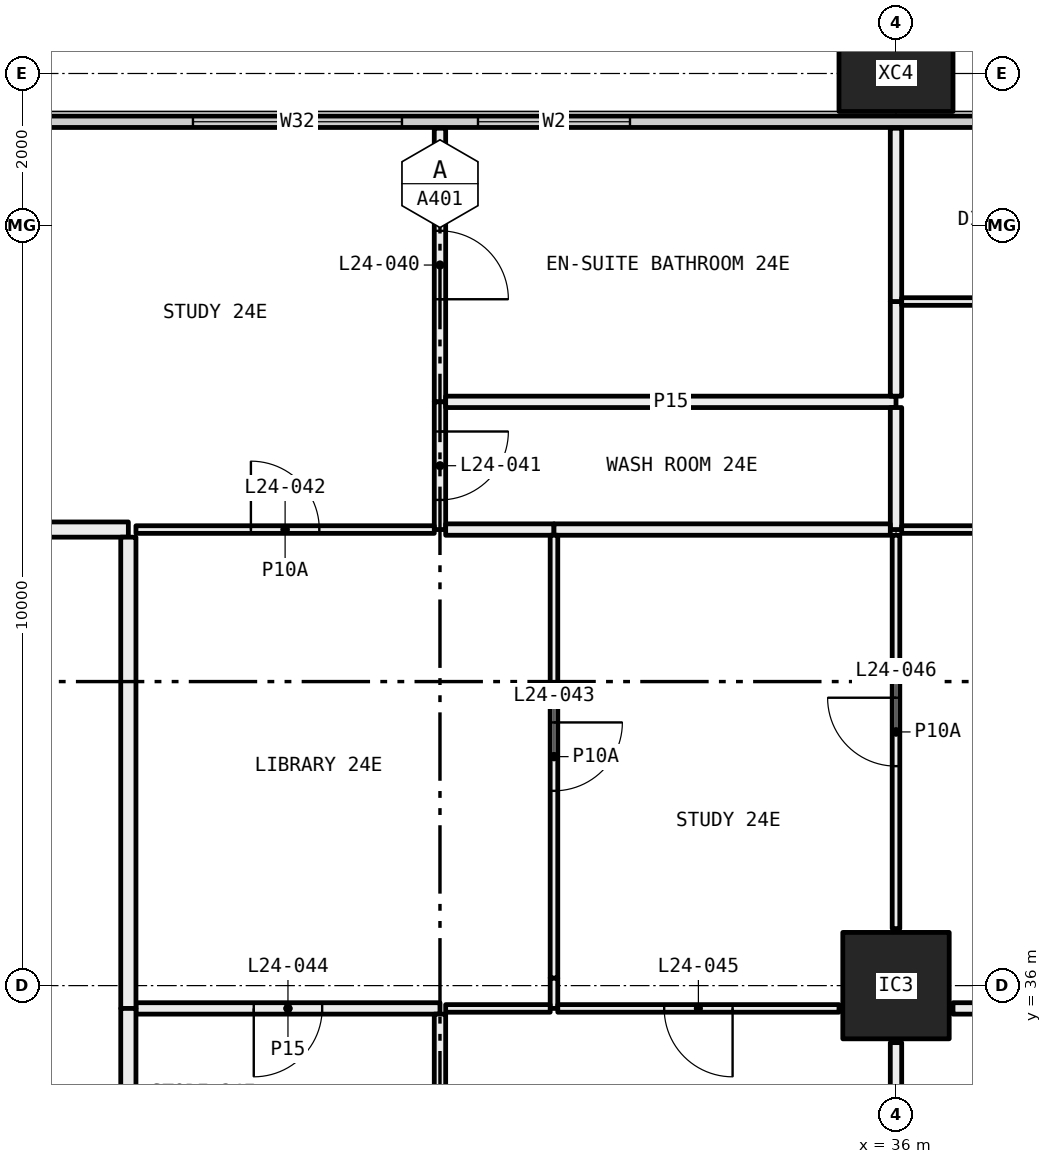
"""IFC4 building model, lengths in metres.
Left out: names, types, materials, properties, quantities, classifications, styles, units other than length and angle.
Written with IfcOpenShell. Run it as: python <this file> out.ifc"""

import sys

from ifc_helpers import new_model, si_unit, direction, frame, frame_2d, origin, origin_2d, place, context, subcontext, project, spatial, rectangle, hollow_rectangle, extrude, element, fill, save


model = new_model("IFC4")
c1 = context("Model", 3, precision=1e-05, world=origin(), true_north=direction((0.0, 1.0)))
c2 = subcontext(c1, "Body", "Model", "MODEL_VIEW")
j1 = project(units=[si_unit("LENGTHUNIT", "METRE"), si_unit("PLANEANGLEUNIT", "RADIAN")], contexts=[c1])
p1 = place(None, origin())
s1 = spatial("IfcSite", under=j1, at=p1, CompositionType="ELEMENT")
p2 = place(p1, origin())
s2 = spatial("IfcBuilding", under=s1, at=p2, CompositionType="ELEMENT")
p3 = place(p2, frame((0.0, 0.0, 96.6)))
s3 = spatial("IfcBuildingStorey", under=s2, at=p3, CompositionType="ELEMENT", Elevation=96.6)
p4 = place(p3, frame((36.0, 36.0, 0.0), z_axis=(0.0, 0.0, 1.0), x_axis=(1.0, 0.0, 0.0)))
e1 = element("IfcColumn", 1, at=p4, inside=s3, PredefinedType="COLUMN", context=c2, shape_type="SweptSolid", body=[
    extrude(hollow_rectangle(XDim=1.4, YDim=1.4, WallThickness=0.06, at=origin_2d()), origin(), (0.0, 0.0, 1.0), 3.05),
])
p5 = place(p3, frame((36.0, 48.0, -0.4), z_axis=(0.0, 0.0, 1.0), x_axis=(1.0, 0.0, 0.0)))
e2 = element("IfcColumn", 2, at=p5, inside=s3, PredefinedType="COLUMN", context=c2, shape_type="SweptSolid", body=[
    extrude(hollow_rectangle(XDim=1.5, YDim=1.0, WallThickness=0.06, at=origin_2d()), origin(), (0.0, 0.0, 1.0), 3.45),
])
p6 = place(p3, frame((6.56, 47.365, 0.0), z_axis=(0.0, 0.0, 1.0), x_axis=(1.0, 0.0, 0.0)))
e3 = element("IfcWall", 3, at=p6, inside=s3, PredefinedType="ELEMENTEDWALL", context=c2, shape_type="SweptSolid", body=[
    extrude(rectangle(XDim=58.88, YDim=0.15, at=frame_2d((29.44, 0.0))), origin(), (0.0, 0.0, 1.0), 3.05),
])
p7 = place(p6, frame((0.44, 0.0, 0.45)))
e4 = element("IfcOpeningElement", 4, at=p7, cuts=e3, PredefinedType="OPENING", context=c2, shape_type="SweptSolid", body=[
    extrude(rectangle(XDim=4.5, YDim=2.55, at=frame_2d((2.25, 1.275))), frame((0.0, 0.085, 0.0), z_axis=(0.0, -1.0, 0.0), x_axis=(1.0, 0.0, 0.0)), (0.0, 0.0, 1.0), 0.17),
])
p8 = place(p6, frame((8.19, 0.0, 0.45)))
e5 = element("IfcOpeningElement", 5, at=p8, cuts=e3, PredefinedType="OPENING", context=c2, shape_type="SweptSolid", body=[
    extrude(rectangle(XDim=2.75, YDim=2.55, at=frame_2d((1.375, 1.275))), frame((0.0, 0.085, 0.0), z_axis=(0.0, -1.0, 0.0), x_axis=(1.0, 0.0, 0.0)), (0.0, 0.0, 1.0), 0.17),
])
p9 = place(p6, frame((11.94, 0.0, 0.45)))
e6 = element("IfcOpeningElement", 6, at=p9, cuts=e3, PredefinedType="OPENING", context=c2, shape_type="SweptSolid", body=[
    extrude(rectangle(XDim=2.75, YDim=2.55, at=frame_2d((1.375, 1.275))), frame((0.0, 0.085, 0.0), z_axis=(0.0, -1.0, 0.0), x_axis=(1.0, 0.0, 0.0)), (0.0, 0.0, 1.0), 0.17),
])
p10 = place(p6, frame((20.19, 0.0, 0.45)))
e7 = element("IfcOpeningElement", 7, at=p10, cuts=e3, PredefinedType="OPENING", context=c2, shape_type="SweptSolid", body=[
    extrude(rectangle(XDim=2.75, YDim=2.55, at=frame_2d((1.375, 1.275))), frame((0.0, 0.085, 0.0), z_axis=(0.0, -1.0, 0.0), x_axis=(1.0, 0.0, 0.0)), (0.0, 0.0, 1.0), 0.17),
])
p11 = place(p6, frame((23.94, 0.0, 0.45)))
e8 = element("IfcOpeningElement", 8, at=p11, cuts=e3, PredefinedType="OPENING", context=c2, shape_type="SweptSolid", body=[
    extrude(rectangle(XDim=2.0, YDim=2.55, at=frame_2d((1.0, 1.275))), frame((0.0, 0.085, 0.0), z_axis=(0.0, -1.0, 0.0), x_axis=(1.0, 0.0, 0.0)), (0.0, 0.0, 1.0), 0.17),
])
p12 = place(p6, frame((32.19, 0.0, 0.45)))
e9 = element("IfcOpeningElement", 9, at=p12, cuts=e3, PredefinedType="OPENING", context=c2, shape_type="SweptSolid", body=[
    extrude(rectangle(XDim=2.75, YDim=2.55, at=frame_2d((1.375, 1.275))), frame((0.0, 0.085, 0.0), z_axis=(0.0, -1.0, 0.0), x_axis=(1.0, 0.0, 0.0)), (0.0, 0.0, 1.0), 0.17),
])
p13 = place(p6, frame((35.94, 0.0, 0.45)))
e10 = element("IfcOpeningElement", 10, at=p13, cuts=e3, PredefinedType="OPENING", context=c2, shape_type="SweptSolid", body=[
    extrude(rectangle(XDim=2.75, YDim=2.55, at=frame_2d((1.375, 1.275))), frame((0.0, 0.085, 0.0), z_axis=(0.0, -1.0, 0.0), x_axis=(1.0, 0.0, 0.0)), (0.0, 0.0, 1.0), 0.17),
])
p14 = place(p6, frame((44.19, 0.0, 0.45)))
e11 = element("IfcOpeningElement", 11, at=p14, cuts=e3, PredefinedType="OPENING", context=c2, shape_type="SweptSolid", body=[
    extrude(rectangle(XDim=2.75, YDim=2.55, at=frame_2d((1.375, 1.275))), frame((0.0, 0.085, 0.0), z_axis=(0.0, -1.0, 0.0), x_axis=(1.0, 0.0, 0.0)), (0.0, 0.0, 1.0), 0.17),
])
p15 = place(p6, frame((47.94, 0.0, 0.45)))
e12 = element("IfcOpeningElement", 12, at=p15, cuts=e3, PredefinedType="OPENING", context=c2, shape_type="SweptSolid", body=[
    extrude(rectangle(XDim=2.0, YDim=2.55, at=frame_2d((1.0, 1.275))), frame((0.0, 0.085, 0.0), z_axis=(0.0, -1.0, 0.0), x_axis=(1.0, 0.0, 0.0)), (0.0, 0.0, 1.0), 0.17),
])
p16 = place(p6, frame((53.94, 0.0, 0.45)))
e13 = element("IfcOpeningElement", 13, at=p16, cuts=e3, PredefinedType="OPENING", context=c2, shape_type="SweptSolid", body=[
    extrude(rectangle(XDim=4.5, YDim=2.55, at=frame_2d((2.25, 1.275))), frame((0.0, 0.085, 0.0), z_axis=(0.0, -1.0, 0.0), x_axis=(1.0, 0.0, 0.0)), (0.0, 0.0, 1.0), 0.17),
])
p17 = place(p3, frame((30.0, 43.68, 0.0), z_axis=(0.0, 0.0, 1.0), x_axis=(0.0, 1.0, 0.0)))
e14 = element("IfcWall", 14, at=p17, inside=s3, PredefinedType="PARTITIONING", context=c2, shape_type="SweptSolid", body=[
    extrude(rectangle(XDim=3.6, YDim=0.15, at=frame_2d((1.8, 0.0))), origin(), (0.0, 0.0, 1.0), 3.05),
])
p18 = place(p17, frame((1.35, 0.0, 0.0)))
e15 = element("IfcOpeningElement", 15, at=p18, cuts=e14, PredefinedType="OPENING", context=c2, shape_type="SweptSolid", body=[
    extrude(rectangle(XDim=0.9, YDim=2.1, at=frame_2d((0.45, 1.05))), frame((0.0, 0.085, 0.0), z_axis=(0.0, -1.0, 0.0), x_axis=(1.0, 0.0, 0.0)), (0.0, 0.0, 1.0), 0.17),
])
p19 = place(p3, frame((30.0, 42.0, 0.0), z_axis=(0.0, 0.0, 1.0), x_axis=(0.0, 1.0, 0.0)))
e16 = element("IfcWall", 16, at=p19, inside=s3, PredefinedType="PARTITIONING", context=c2, shape_type="SweptSolid", body=[
    extrude(rectangle(XDim=1.68, YDim=0.15, at=frame_2d((0.84, 0.0))), origin(), (0.0, 0.0, 1.0), 3.05),
])
p20 = place(p19, frame((0.39, 0.0, 0.0)))
e17 = element("IfcOpeningElement", 17, at=p20, cuts=e16, PredefinedType="OPENING", context=c2, shape_type="SweptSolid", body=[
    extrude(rectangle(XDim=0.9, YDim=2.1, at=frame_2d((0.45, 1.05))), frame((0.0, 0.085, 0.0), z_axis=(0.0, -1.0, 0.0), x_axis=(1.0, 0.0, 0.0)), (0.0, 0.0, 1.0), 0.17),
])
p21 = place(p3, frame((26.0, 42.0, 0.0), z_axis=(0.0, 0.0, 1.0), x_axis=(1.0, 0.0, 0.0)))
e18 = element("IfcWall", 18, at=p21, inside=s3, PredefinedType="PARTITIONING", context=c2, shape_type="SweptSolid", body=[
    extrude(rectangle(XDim=3.925, YDim=0.1, at=frame_2d((1.962, 0.0))), origin(), (0.0, 0.0, 1.0), 3.05),
])
p22 = place(p21, frame((1.512, 0.0, 0.0)))
e19 = element("IfcOpeningElement", 19, at=p22, cuts=e18, PredefinedType="OPENING", context=c2, shape_type="SweptSolid", body=[
    extrude(rectangle(XDim=0.9, YDim=2.1, at=frame_2d((0.45, 1.05))), frame((0.0, 0.06, 0.0), z_axis=(0.0, -1.0, 0.0), x_axis=(1.0, 0.0, 0.0)), (0.0, 0.0, 1.0), 0.12),
])
p23 = place(p3, frame((24.0, 42.0, 0.0), z_axis=(0.0, 0.0, 1.0), x_axis=(1.0, 0.0, 0.0)))
e20 = element("IfcWall", 20, at=p23, inside=s3, PredefinedType="PARTITIONING", context=c2, shape_type="SweptSolid", body=[
    extrude(rectangle(XDim=1.9, YDim=0.2, at=frame_2d((0.95, 0.0))), origin(), (0.0, 0.0, 1.0), 3.05),
])
p24 = place(p3, frame((30.075, 43.68, 0.0), z_axis=(0.0, 0.0, 1.0), x_axis=(1.0, 0.0, 0.0)))
e21 = element("IfcWall", 21, at=p24, inside=s3, PredefinedType="PARTITIONING", context=c2, shape_type="SweptSolid", body=[
    extrude(rectangle(XDim=5.925, YDim=0.15, at=frame_2d((2.962, 0.0))), origin(), (0.0, 0.0, 1.0), 2.45),
])
p25 = place(p3, frame((36.0, 43.755, 0.0), z_axis=(0.0, 0.0, 1.0), x_axis=(0.0, 1.0, 0.0)))
e22 = element("IfcWall", 22, at=p25, inside=s3, PredefinedType="PARTITIONING", context=c2, shape_type="SweptSolid", body=[
    extrude(rectangle(XDim=1.245, YDim=0.15, at=frame_2d((0.623, 0.0))), origin(), (0.0, 0.0, 1.0), 2.45),
])
p26 = place(p3, frame((36.0, 45.0, 0.0), z_axis=(0.0, 0.0, 1.0), x_axis=(0.0, 1.0, 0.0)))
e23 = element("IfcWall", 23, at=p26, inside=s3, PredefinedType="PARTITIONING", context=c2, shape_type="SweptSolid", body=[
    extrude(rectangle(XDim=2.28, YDim=0.15, at=frame_2d((1.14, 0.0))), origin(), (0.0, 0.0, 1.0), 2.45),
])
p27 = place(p3, frame((36.0, 42.0, 0.0), z_axis=(0.0, 0.0, 1.0), x_axis=(0.0, 1.0, 0.0)))
e24 = element("IfcWall", 24, at=p27, inside=s3, PredefinedType="PARTITIONING", context=c2, shape_type="SweptSolid", body=[
    extrude(rectangle(XDim=1.605, YDim=0.15, at=frame_2d((0.802, 0.0))), origin(), (0.0, 0.0, 1.0), 2.45),
])
p28 = place(p3, frame((30.075, 42.0, 0.0), z_axis=(0.0, 0.0, 1.0), x_axis=(1.0, 0.0, 0.0)))
e25 = element("IfcWall", 25, at=p28, inside=s3, PredefinedType="PARTITIONING", context=c2, shape_type="SweptSolid", body=[
    extrude(rectangle(XDim=1.425, YDim=0.15, at=frame_2d((0.712, 0.0))), origin(), (0.0, 0.0, 1.0), 3.05),
])
p29 = place(p3, frame((31.5, 42.0, 0.0), z_axis=(0.0, 0.0, 1.0), x_axis=(1.0, 0.0, 0.0)))
e26 = element("IfcWall", 26, at=p29, inside=s3, PredefinedType="PARTITIONING", context=c2, shape_type="SweptSolid", body=[
    extrude(rectangle(XDim=4.425, YDim=0.15, at=frame_2d((2.212, 0.0))), origin(), (0.0, 0.0, 1.0), 2.45),
])
p30 = place(p3, frame((54.0, 45.0, 0.0), z_axis=(0.0, 0.0, 1.0), x_axis=(-1.0, 0.0, 0.0)))
e27 = element("IfcWall", 27, at=p30, inside=s3, PredefinedType="PARTITIONING", context=c2, shape_type="SweptSolid", body=[
    extrude(rectangle(XDim=17.925, YDim=0.1, at=frame_2d((8.962, 0.0))), origin(), (0.0, 0.0, 1.0), 2.45),
])
p31 = place(p30, frame((8.512, 0.0, 0.0)))
e28 = element("IfcOpeningElement", 28, at=p31, cuts=e27, PredefinedType="OPENING", context=c2, shape_type="SweptSolid", body=[
    extrude(rectangle(XDim=0.9, YDim=2.1, at=frame_2d((0.45, 1.05))), frame((0.0, 0.06, 0.0), z_axis=(0.0, -1.0, 0.0), x_axis=(1.0, 0.0, 0.0)), (0.0, 0.0, 1.0), 0.12),
])
p32 = place(p3, frame((36.075, 42.0, 0.0), z_axis=(0.0, 0.0, 1.0), x_axis=(1.0, 0.0, 0.0)))
e29 = element("IfcWall", 29, at=p32, inside=s3, PredefinedType="PARTITIONING", context=c2, shape_type="SweptSolid", body=[
    extrude(rectangle(XDim=9.925, YDim=0.1, at=frame_2d((4.962, 0.0))), origin(), (0.0, 0.0, 1.0), 2.45),
])
p33 = place(p32, frame((4.512, 0.0, 0.0)))
e30 = element("IfcOpeningElement", 30, at=p33, cuts=e29, PredefinedType="OPENING", context=c2, shape_type="SweptSolid", body=[
    extrude(rectangle(XDim=0.9, YDim=2.1, at=frame_2d((0.45, 1.05))), frame((0.0, 0.06, 0.0), z_axis=(0.0, -1.0, 0.0), x_axis=(1.0, 0.0, 0.0)), (0.0, 0.0, 1.0), 0.12),
])
p34 = place(p3, frame((31.5, 35.7, 0.0), z_axis=(0.0, 0.0, 1.0), x_axis=(0.0, 1.0, 0.0)))
e31 = element("IfcWall", 31, at=p34, inside=s3, PredefinedType="PARTITIONING", context=c2, shape_type="SweptSolid", body=[
    extrude(rectangle(XDim=0.4, YDim=0.1, at=frame_2d((0.2, 0.0))), origin(), (0.0, 0.0, 1.0), 2.45),
])
p35 = place(p3, frame((31.5, 36.1, 0.0), z_axis=(0.0, 0.0, 1.0), x_axis=(0.0, 1.0, 0.0)))
e32 = element("IfcWall", 32, at=p35, inside=s3, PredefinedType="PARTITIONING", context=c2, shape_type="SweptSolid", body=[
    extrude(rectangle(XDim=5.825, YDim=0.1, at=frame_2d((2.913, 0.0))), origin(), (0.0, 0.0, 1.0), 3.05),
])
p36 = place(p35, frame((2.462, 0.0, 0.0)))
e33 = element("IfcOpeningElement", 33, at=p36, cuts=e32, PredefinedType="OPENING", context=c2, shape_type="SweptSolid", body=[
    extrude(rectangle(XDim=0.9, YDim=2.1, at=frame_2d((0.45, 1.05))), frame((0.0, 0.06, 0.0), z_axis=(0.0, -1.0, 0.0), x_axis=(1.0, 0.0, 0.0)), (0.0, 0.0, 1.0), 0.12),
])
p37 = place(p3, frame((26.0, 35.7, 0.0), z_axis=(0.0, 0.0, 1.0), x_axis=(1.0, 0.0, 0.0)))
e34 = element("IfcWall", 34, at=p37, inside=s3, PredefinedType="PARTITIONING", context=c2, shape_type="SweptSolid", body=[
    extrude(rectangle(XDim=4.0, YDim=0.15, at=frame_2d((2.0, 0.0))), origin(), (0.0, 0.0, 1.0), 3.05),
])
p38 = place(p37, frame((1.55, 0.0, 0.0)))
e35 = element("IfcOpeningElement", 35, at=p38, cuts=e34, PredefinedType="OPENING", context=c2, shape_type="SweptSolid", body=[
    extrude(rectangle(XDim=0.9, YDim=2.1, at=frame_2d((0.45, 1.05))), frame((0.0, 0.085, 0.0), z_axis=(0.0, -1.0, 0.0), x_axis=(1.0, 0.0, 0.0)), (0.0, 0.0, 1.0), 0.17),
])
p39 = place(p3, frame((30.075, 35.7, 0.0), z_axis=(0.0, 0.0, 1.0), x_axis=(1.0, 0.0, 0.0)))
e36 = element("IfcWall", 36, at=p39, inside=s3, PredefinedType="PARTITIONING", context=c2, shape_type="SweptSolid", body=[
    extrude(rectangle(XDim=1.375, YDim=0.1, at=frame_2d((0.688, 0.0))), origin(), (0.0, 0.0, 1.0), 3.05),
])
p40 = place(p3, frame((25.9, 41.9, 0.0), z_axis=(0.0, 0.0, 1.0), x_axis=(0.0, -1.0, 0.0)))
e37 = element("IfcWall", 37, at=p40, inside=s3, PredefinedType="PARTITIONING", context=c2, shape_type="SweptSolid", body=[
    extrude(rectangle(XDim=6.2, YDim=0.2, at=frame_2d((3.1, 0.0))), origin(), (0.0, 0.0, 1.0), 2.45),
])
p41 = place(p3, frame((31.55, 35.7, 0.0), z_axis=(0.0, 0.0, 1.0), x_axis=(1.0, 0.0, 0.0)))
e38 = element("IfcWall", 38, at=p41, inside=s3, PredefinedType="PARTITIONING", context=c2, shape_type="SweptSolid", body=[
    extrude(rectangle(XDim=3.7, YDim=0.1, at=frame_2d((1.85, 0.0))), origin(), (0.0, 0.0, 1.0), 3.05),
])
p42 = place(p41, frame((1.4, 0.0, 0.0)))
e39 = element("IfcOpeningElement", 39, at=p42, cuts=e38, PredefinedType="OPENING", context=c2, shape_type="SweptSolid", body=[
    extrude(rectangle(XDim=0.9, YDim=2.1, at=frame_2d((0.45, 1.05))), frame((0.0, 0.06, 0.0), z_axis=(0.0, -1.0, 0.0), x_axis=(1.0, 0.0, 0.0)), (0.0, 0.0, 1.0), 0.12),
])
p43 = place(p3, frame((36.0, 36.75, 0.0), z_axis=(0.0, 0.0, 1.0), x_axis=(0.0, 1.0, 0.0)))
e40 = element("IfcWall", 40, at=p43, inside=s3, PredefinedType="PARTITIONING", context=c2, shape_type="SweptSolid", body=[
    extrude(rectangle(XDim=5.175, YDim=0.1, at=frame_2d((2.587, 0.0))), origin(), (0.0, 0.0, 1.0), 2.45),
])
p44 = place(p43, frame((2.137, 0.0, 0.0)))
e41 = element("IfcOpeningElement", 41, at=p44, cuts=e40, PredefinedType="OPENING", context=c2, shape_type="SweptSolid", body=[
    extrude(rectangle(XDim=0.9, YDim=2.1, at=frame_2d((0.45, 1.05))), frame((0.0, 0.06, 0.0), z_axis=(0.0, -1.0, 0.0), x_axis=(1.0, 0.0, 0.0)), (0.0, 0.0, 1.0), 0.12),
])
p45 = place(p3, frame((30.0, 33.675, 0.0), z_axis=(0.0, 0.0, 1.0), x_axis=(0.0, 1.0, 0.0)))
e42 = element("IfcWall", 42, at=p45, inside=s3, PredefinedType="PARTITIONING", context=c2, shape_type="SweptSolid", body=[
    extrude(rectangle(XDim=1.95, YDim=0.15, at=frame_2d((0.975, 0.0))), origin(), (0.0, 0.0, 1.0), 3.05),
])
p46 = place(p3, frame((25.9, 35.7, 0.0), z_axis=(0.0, 0.0, 1.0), x_axis=(0.0, -1.0, 0.0)))
e43 = element("IfcWall", 43, at=p46, inside=s3, PredefinedType="PARTITIONING", context=c2, shape_type="SweptSolid", body=[
    extrude(rectangle(XDim=2.1, YDim=0.2, at=frame_2d((1.05, 0.0))), origin(), (0.0, 0.0, 1.0), 3.05),
])
p47 = place(p3, frame((36.0, 31.3, 0.0), z_axis=(0.0, 0.0, 1.0), x_axis=(0.0, 1.0, 0.0)))
e44 = element("IfcWall", 44, at=p47, inside=s3, PredefinedType="PARTITIONING", context=c2, shape_type="SweptSolid", body=[
    extrude(rectangle(XDim=3.95, YDim=0.15, at=frame_2d((1.975, 0.0))), origin(), (0.0, 0.0, 1.0), 2.45),
])
p48 = place(p47, frame((1.525, 0.0, 0.0)))
e45 = element("IfcOpeningElement", 45, at=p48, cuts=e44, PredefinedType="OPENING", context=c2, shape_type="SweptSolid", body=[
    extrude(rectangle(XDim=0.9, YDim=2.1, at=frame_2d((0.45, 1.05))), frame((0.0, 0.085, 0.0), z_axis=(0.0, -1.0, 0.0), x_axis=(1.0, 0.0, 0.0)), (0.0, 0.0, 1.0), 0.17),
])
p49 = place(p3, frame((36.75, 35.7, 0.0), z_axis=(0.0, 0.0, 1.0), x_axis=(1.0, 0.0, 0.0)))
e46 = element("IfcWall", 46, at=p49, inside=s3, PredefinedType="PARTITIONING", context=c2, shape_type="SweptSolid", body=[
    extrude(rectangle(XDim=1.917, YDim=0.15, at=frame_2d((0.958, 0.0))), origin(), (0.0, 0.0, 1.0), 3.05),
])
p50 = place(p10, origin())
e47 = element("IfcWindow", 47, at=p50, inside=s3, PartitioningType="SINGLE_PANEL", PredefinedType="WINDOW", context=c2, shape_type="SweptSolid", body=[
    extrude(rectangle(XDim=2.75, YDim=2.55, at=frame_2d((1.375, 1.275))), frame((0.0, 0.03, 0.0), z_axis=(0.0, -1.0, 0.0), x_axis=(1.0, 0.0, 0.0)), (0.0, 0.0, 1.0), 0.06),
])
fill(e7, e47)
p51 = place(p11, origin())
e48 = element("IfcWindow", 48, at=p51, inside=s3, PartitioningType="SINGLE_PANEL", PredefinedType="WINDOW", context=c2, shape_type="SweptSolid", body=[
    extrude(rectangle(XDim=2.0, YDim=2.55, at=frame_2d((1.0, 1.275))), frame((0.0, 0.03, 0.0), z_axis=(0.0, -1.0, 0.0), x_axis=(1.0, 0.0, 0.0)), (0.0, 0.0, 1.0), 0.06),
])
fill(e8, e48)
p52 = place(p18, frame((0.9, 0.0, 0.0), x_axis=(-1.0, 0.0, 0.0)))
e49 = element("IfcDoor", 49, at=p52, inside=s3, OperationType="SINGLE_SWING_LEFT", PredefinedType="DOOR", context=c2, shape_type="SweptSolid", body=[
    extrude(rectangle(XDim=0.9, YDim=2.1, at=frame_2d((0.45, 1.05))), frame((0.0, 0.025, 0.0), z_axis=(0.0, -1.0, 0.0), x_axis=(1.0, 0.0, 0.0)), (0.0, 0.0, 1.0), 0.05),
])
fill(e15, e49)
p53 = place(p20, frame((0.9, 0.0, 0.0), x_axis=(-1.0, 0.0, 0.0)))
e50 = element("IfcDoor", 50, at=p53, inside=s3, OperationType="SINGLE_SWING_RIGHT", PredefinedType="DOOR", context=c2, shape_type="SweptSolid", body=[
    extrude(rectangle(XDim=0.9, YDim=2.1, at=frame_2d((0.45, 1.05))), frame((0.0, 0.025, 0.0), z_axis=(0.0, -1.0, 0.0), x_axis=(1.0, 0.0, 0.0)), (0.0, 0.0, 1.0), 0.05),
])
fill(e17, e50)
p54 = place(p22, origin())
e51 = element("IfcDoor", 51, at=p54, inside=s3, OperationType="SINGLE_SWING_RIGHT", PredefinedType="DOOR", context=c2, shape_type="SweptSolid", body=[
    extrude(rectangle(XDim=0.9, YDim=2.1, at=frame_2d((0.45, 1.05))), frame((0.0, 0.025, 0.0), z_axis=(0.0, -1.0, 0.0), x_axis=(1.0, 0.0, 0.0)), (0.0, 0.0, 1.0), 0.05),
])
fill(e19, e51)
p55 = place(p36, frame((0.9, 0.0, 0.0), x_axis=(-1.0, 0.0, 0.0)))
e52 = element("IfcDoor", 52, at=p55, inside=s3, OperationType="SINGLE_SWING_RIGHT", PredefinedType="DOOR", context=c2, shape_type="SweptSolid", body=[
    extrude(rectangle(XDim=0.9, YDim=2.1, at=frame_2d((0.45, 1.05))), frame((0.0, 0.025, 0.0), z_axis=(0.0, -1.0, 0.0), x_axis=(1.0, 0.0, 0.0)), (0.0, 0.0, 1.0), 0.05),
])
fill(e33, e52)
p56 = place(p38, frame((0.9, 0.0, 0.0), x_axis=(-1.0, 0.0, 0.0)))
e53 = element("IfcDoor", 53, at=p56, inside=s3, OperationType="SINGLE_SWING_LEFT", PredefinedType="DOOR", context=c2, shape_type="SweptSolid", body=[
    extrude(rectangle(XDim=0.9, YDim=2.1, at=frame_2d((0.45, 1.05))), frame((0.0, 0.025, 0.0), z_axis=(0.0, -1.0, 0.0), x_axis=(1.0, 0.0, 0.0)), (0.0, 0.0, 1.0), 0.05),
])
fill(e35, e53)
p57 = place(p42, frame((0.9, 0.0, 0.0), x_axis=(-1.0, 0.0, 0.0)))
e54 = element("IfcDoor", 54, at=p57, inside=s3, OperationType="SINGLE_SWING_RIGHT", PredefinedType="DOOR", context=c2, shape_type="SweptSolid", body=[
    extrude(rectangle(XDim=0.9, YDim=2.1, at=frame_2d((0.45, 1.05))), frame((0.0, 0.025, 0.0), z_axis=(0.0, -1.0, 0.0), x_axis=(1.0, 0.0, 0.0)), (0.0, 0.0, 1.0), 0.05),
])
fill(e39, e54)
p58 = place(p44, origin())
e55 = element("IfcDoor", 55, at=p58, inside=s3, OperationType="SINGLE_SWING_LEFT", PredefinedType="DOOR", context=c2, shape_type="SweptSolid", body=[
    extrude(rectangle(XDim=0.9, YDim=2.1, at=frame_2d((0.45, 1.05))), frame((0.0, 0.025, 0.0), z_axis=(0.0, -1.0, 0.0), x_axis=(1.0, 0.0, 0.0)), (0.0, 0.0, 1.0), 0.05),
])
fill(e41, e55)
save(model, sys.argv[1])
